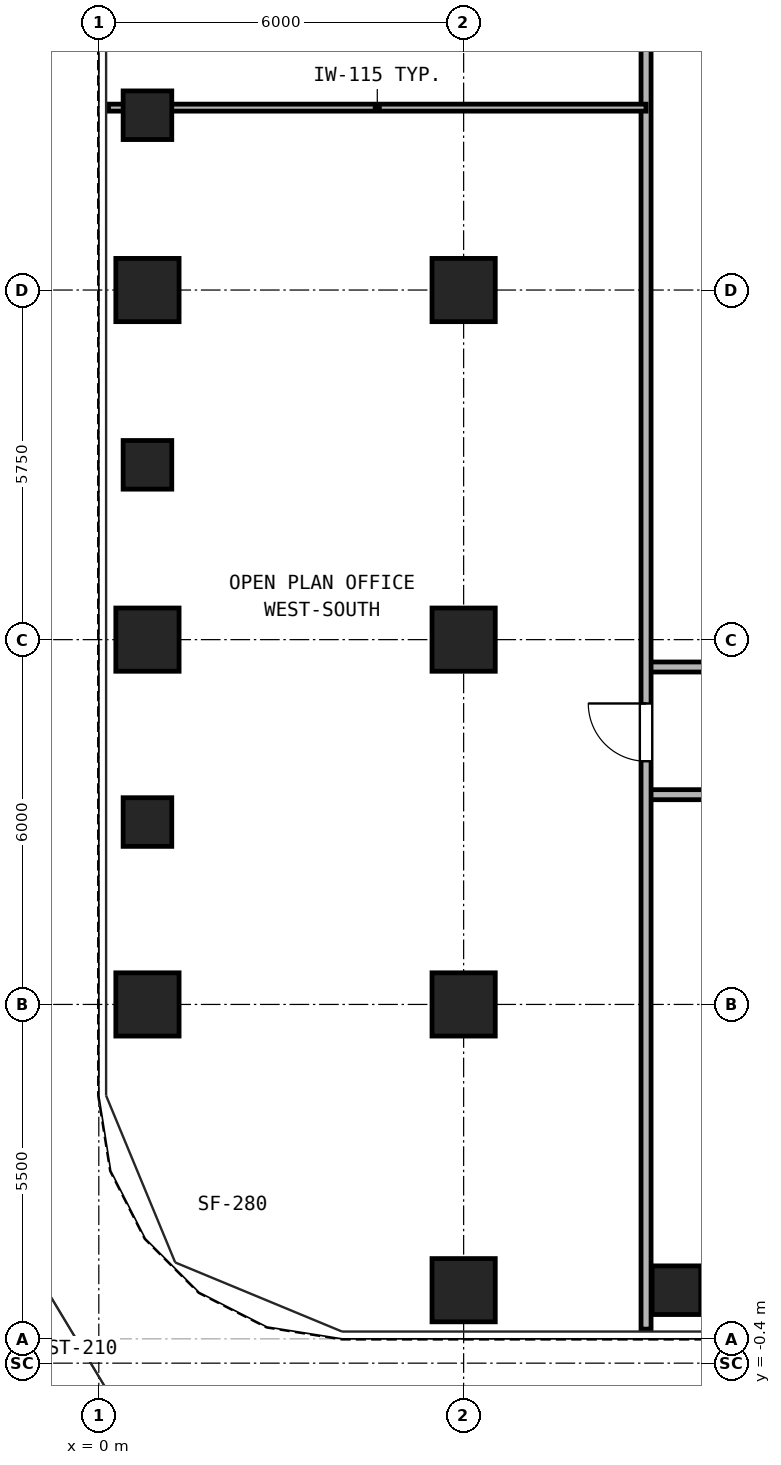
"""IFC4 building model, lengths in metres.
Left out: names, types, materials, properties, quantities, classifications, styles, units other than length and angle.
Written with IfcOpenShell. Run it as: python <this file> out.ifc"""

import sys

from ifc_helpers import new_model, si_unit, direction, frame, frame_2d, origin, origin_2d, place, context, subcontext, project, spatial, rectangle, hollow_rectangle, extrude, source, transform, mapped, element, fill, save


model = new_model("IFC4")
c1 = context("Model", 3, precision=1e-05, world=origin(), true_north=direction((0.0, 1.0)))
c2 = subcontext(c1, "Body", "Model", "MODEL_VIEW")
j1 = project(units=[si_unit("LENGTHUNIT", "METRE"), si_unit("PLANEANGLEUNIT", "RADIAN")], contexts=[c1])
p1 = place(None, origin())
s1 = spatial("IfcSite", under=j1, at=p1, CompositionType="ELEMENT")
p2 = place(p1, origin())
s2 = spatial("IfcBuilding", under=s1, at=p2, CompositionType="ELEMENT")
p3 = place(p2, frame((0.0, 0.0, 54.9)))
s3 = spatial("IfcBuildingStorey", under=s2, at=p3, CompositionType="ELEMENT", Elevation=54.9)
m1 = source(origin(), c2, "Body", "SweptSolid", [
    extrude(hollow_rectangle(XDim=1.04, YDim=1.04, WallThickness=0.065, at=origin_2d()), origin(), (0.0, 0.0, 1.0), 3.32),
])
for number, where, z_axis, x_axis in (
    (1, (6.0, 0.8, 0.0), (0.0, 0.0, 1.0), (1.0, 0.0, 0.0)),
    (2, (0.8, 5.5, 0.0), (0.0, 0.0, 1.0), (1.0, 0.0, 0.0)),
    (3, (0.8, 11.5, 0.0), (0.0, 0.0, 1.0), (1.0, 0.0, 0.0)),
    (4, (0.8, 17.25, 0.0), (0.0, 0.0, 1.0), (1.0, 0.0, 0.0)),
    (5, (6.0, 5.5, 0.0), (0.0, 0.0, 1.0), (1.0, 0.0, 0.0)),
    (6, (6.0, 11.5, 0.0), (0.0, 0.0, 1.0), (1.0, 0.0, 0.0)),
    (7, (6.0, 17.25, 0.0), (0.0, 0.0, 1.0), (1.0, 0.0, 0.0)),
):
    element("IfcColumn", number, at=place(p3, frame(where, z_axis=z_axis, x_axis=x_axis)), inside=s3, PredefinedType="COLUMN", context=c2, shape_type="MappedRepresentation", body=[
        mapped(m1, transform((0.0, 0.0, 0.0), x_axis=(1.0, 0.0, 0.0), y_axis=(0.0, 1.0, 0.0), z_axis=(0.0, 0.0, 1.0), scale=1.0)),
    ])
m2 = source(origin(), c2, "Body", "SweptSolid", [
    extrude(hollow_rectangle(XDim=0.8, YDim=0.8, WallThickness=0.045, at=origin_2d()), origin(), (0.0, 0.0, 1.0), 3.32),
])
for number, where, z_axis, x_axis in (
    (8, (9.5, 0.8, 0.0), (0.0, 0.0, 1.0), (1.0, 0.0, 0.0)),
    (9, (0.8, 8.5, 0.0), (0.0, 0.0, 1.0), (1.0, 0.0, 0.0)),
    (10, (0.8, 14.375, 0.0), (0.0, 0.0, 1.0), (1.0, 0.0, 0.0)),
    (11, (0.8, 20.125, 0.0), (0.0, 0.0, 1.0), (1.0, 0.0, 0.0)),
):
    element("IfcColumn", number, at=place(p3, frame(where, z_axis=z_axis, x_axis=x_axis)), inside=s3, PredefinedType="COLUMN", context=c2, shape_type="MappedRepresentation", body=[
        mapped(m2, transform((0.0, 0.0, 0.0), x_axis=(1.0, 0.0, 0.0), y_axis=(0.0, 1.0, 0.0), z_axis=(0.0, 0.0, 1.0), scale=1.0)),
    ])
p4 = place(p3, frame((9.0, 8.95, 0.0), z_axis=(0.0, 0.0, 1.0), x_axis=(1.0, 0.0, 0.0)))
e12 = element("IfcWall", 12, at=p4, inside=s3, PredefinedType="PARTITIONING", context=c2, shape_type="SweptSolid", body=[
    extrude(rectangle(XDim=29.0, YDim=0.165, at=frame_2d((14.5, 0.0))), origin(), (0.0, 0.0, 1.0), 3.32),
])
p5 = place(p4, frame((2.1, 0.0, 0.0)))
e13 = element("IfcOpeningElement", 13, at=p5, cuts=e12, PredefinedType="OPENING", context=c2, shape_type="SweptSolid", body=[
    extrude(rectangle(XDim=0.95, YDim=2.15, at=frame_2d((0.475, 1.075))), frame((0.0, 0.093, 0.0), z_axis=(0.0, -1.0, 0.0), x_axis=(1.0, 0.0, 0.0)), (0.0, 0.0, 1.0), 0.185),
])
p6 = place(p4, frame((7.3, 0.0, 0.0)))
e14 = element("IfcOpeningElement", 14, at=p6, cuts=e12, PredefinedType="OPENING", context=c2, shape_type="SweptSolid", body=[
    extrude(rectangle(XDim=0.95, YDim=2.15, at=frame_2d((0.475, 1.075))), frame((0.0, 0.093, 0.0), z_axis=(0.0, -1.0, 0.0), x_axis=(1.0, 0.0, 0.0)), (0.0, 0.0, 1.0), 0.185),
])
p7 = place(p4, frame((12.5, 0.0, 0.0)))
e15 = element("IfcOpeningElement", 15, at=p7, cuts=e12, PredefinedType="OPENING", context=c2, shape_type="SweptSolid", body=[
    extrude(rectangle(XDim=0.95, YDim=2.15, at=frame_2d((0.475, 1.075))), frame((0.0, 0.093, 0.0), z_axis=(0.0, -1.0, 0.0), x_axis=(1.0, 0.0, 0.0)), (0.0, 0.0, 1.0), 0.185),
])
p8 = place(p4, frame((17.7, 0.0, 0.0)))
e16 = element("IfcOpeningElement", 16, at=p8, cuts=e12, PredefinedType="OPENING", context=c2, shape_type="SweptSolid", body=[
    extrude(rectangle(XDim=0.95, YDim=2.15, at=frame_2d((0.475, 1.075))), frame((0.0, 0.093, 0.0), z_axis=(0.0, -1.0, 0.0), x_axis=(1.0, 0.0, 0.0)), (0.0, 0.0, 1.0), 0.185),
])
p9 = place(p4, frame((22.3, 0.0, 0.0)))
e17 = element("IfcOpeningElement", 17, at=p9, cuts=e12, PredefinedType="OPENING", context=c2, shape_type="SweptSolid", body=[
    extrude(rectangle(XDim=0.95, YDim=2.15, at=frame_2d((0.475, 1.075))), frame((0.0, 0.093, 0.0), z_axis=(0.0, -1.0, 0.0), x_axis=(1.0, 0.0, 0.0)), (0.0, 0.0, 1.0), 0.185),
])
p10 = place(p4, frame((25.4, 0.0, 0.0)))
e18 = element("IfcOpeningElement", 18, at=p10, cuts=e12, PredefinedType="OPENING", context=c2, shape_type="SweptSolid", body=[
    extrude(rectangle(XDim=0.92, YDim=2.1, at=frame_2d((0.46, 1.05))), frame((0.0, 0.093, 0.0), z_axis=(0.0, -1.0, 0.0), x_axis=(1.0, 0.0, 0.0)), (0.0, 0.0, 1.0), 0.185),
])
p11 = place(p4, frame((27.5, 0.0, 0.0)))
e19 = element("IfcOpeningElement", 19, at=p11, cuts=e12, PredefinedType="OPENING", context=c2, shape_type="SweptSolid", body=[
    extrude(rectangle(XDim=0.92, YDim=2.1, at=frame_2d((0.46, 1.05))), frame((0.0, 0.093, 0.0), z_axis=(0.0, -1.0, 0.0), x_axis=(1.0, 0.0, 0.0)), (0.0, 0.0, 1.0), 0.185),
])
p12 = place(p3, frame((9.0, 11.05, 0.0), z_axis=(0.0, 0.0, 1.0), x_axis=(1.0, 0.0, 0.0)))
e20 = element("IfcWall", 20, at=p12, inside=s3, PredefinedType="PARTITIONING", context=c2, shape_type="SweptSolid", body=[
    extrude(rectangle(XDim=7.3, YDim=0.165, at=frame_2d((3.65, 0.0))), origin(), (0.0, 0.0, 1.0), 3.32),
])
p13 = place(p3, frame((9.0, 0.16, 0.0), z_axis=(0.0, 0.0, 1.0), x_axis=(0.0, 1.0, 0.0)))
e21 = element("IfcWall", 21, at=p13, inside=s3, PredefinedType="PARTITIONING", context=c2, shape_type="SweptSolid", body=[
    extrude(rectangle(XDim=40.18, YDim=0.165, at=frame_2d((20.09, 0.0))), origin(), (0.0, 0.0, 1.0), 3.32),
])
p14 = place(p13, frame((9.34, 0.0, 0.0)))
e22 = element("IfcOpeningElement", 22, at=p14, cuts=e21, PredefinedType="OPENING", context=c2, shape_type="SweptSolid", body=[
    extrude(rectangle(XDim=0.95, YDim=2.15, at=frame_2d((0.475, 1.075))), frame((0.0, 0.093, 0.0), z_axis=(0.0, -1.0, 0.0), x_axis=(1.0, 0.0, 0.0)), (0.0, 0.0, 1.0), 0.185),
])
p15 = place(p13, frame((29.69, 0.0, 0.0)))
e23 = element("IfcOpeningElement", 23, at=p15, cuts=e21, PredefinedType="OPENING", context=c2, shape_type="SweptSolid", body=[
    extrude(rectangle(XDim=0.95, YDim=2.15, at=frame_2d((0.475, 1.075))), frame((0.0, 0.093, 0.0), z_axis=(0.0, -1.0, 0.0), x_axis=(1.0, 0.0, 0.0)), (0.0, 0.0, 1.0), 0.185),
])
p16 = place(p3, frame((0.16, 20.25, 0.0), z_axis=(0.0, 0.0, 1.0), x_axis=(1.0, 0.0, 0.0)))
e24 = element("IfcWall", 24, at=p16, inside=s3, PredefinedType="PARTITIONING", context=c2, shape_type="SweptSolid", body=[
    extrude(rectangle(XDim=8.84, YDim=0.115, at=frame_2d((4.42, 0.0))), origin(), (0.0, 0.0, 1.0), 2.898),
])
p17 = place(p14, frame((0.95, 0.0, 0.0), z_axis=(0.0, 0.0, 1.0), x_axis=(-1.0, 0.0, 0.0)))
e25 = element("IfcDoor", 25, at=p17, inside=s3, OperationType="SINGLE_SWING_RIGHT", PredefinedType="DOOR", context=c2, shape_type="SweptSolid", body=[
    extrude(rectangle(XDim=0.95, YDim=2.15, at=frame_2d((0.475, 1.075))), frame((0.0, 0.025, 0.0), z_axis=(0.0, -1.0, 0.0), x_axis=(1.0, 0.0, 0.0)), (0.0, 0.0, 1.0), 0.05),
])
fill(e22, e25)
save(model, sys.argv[1])
